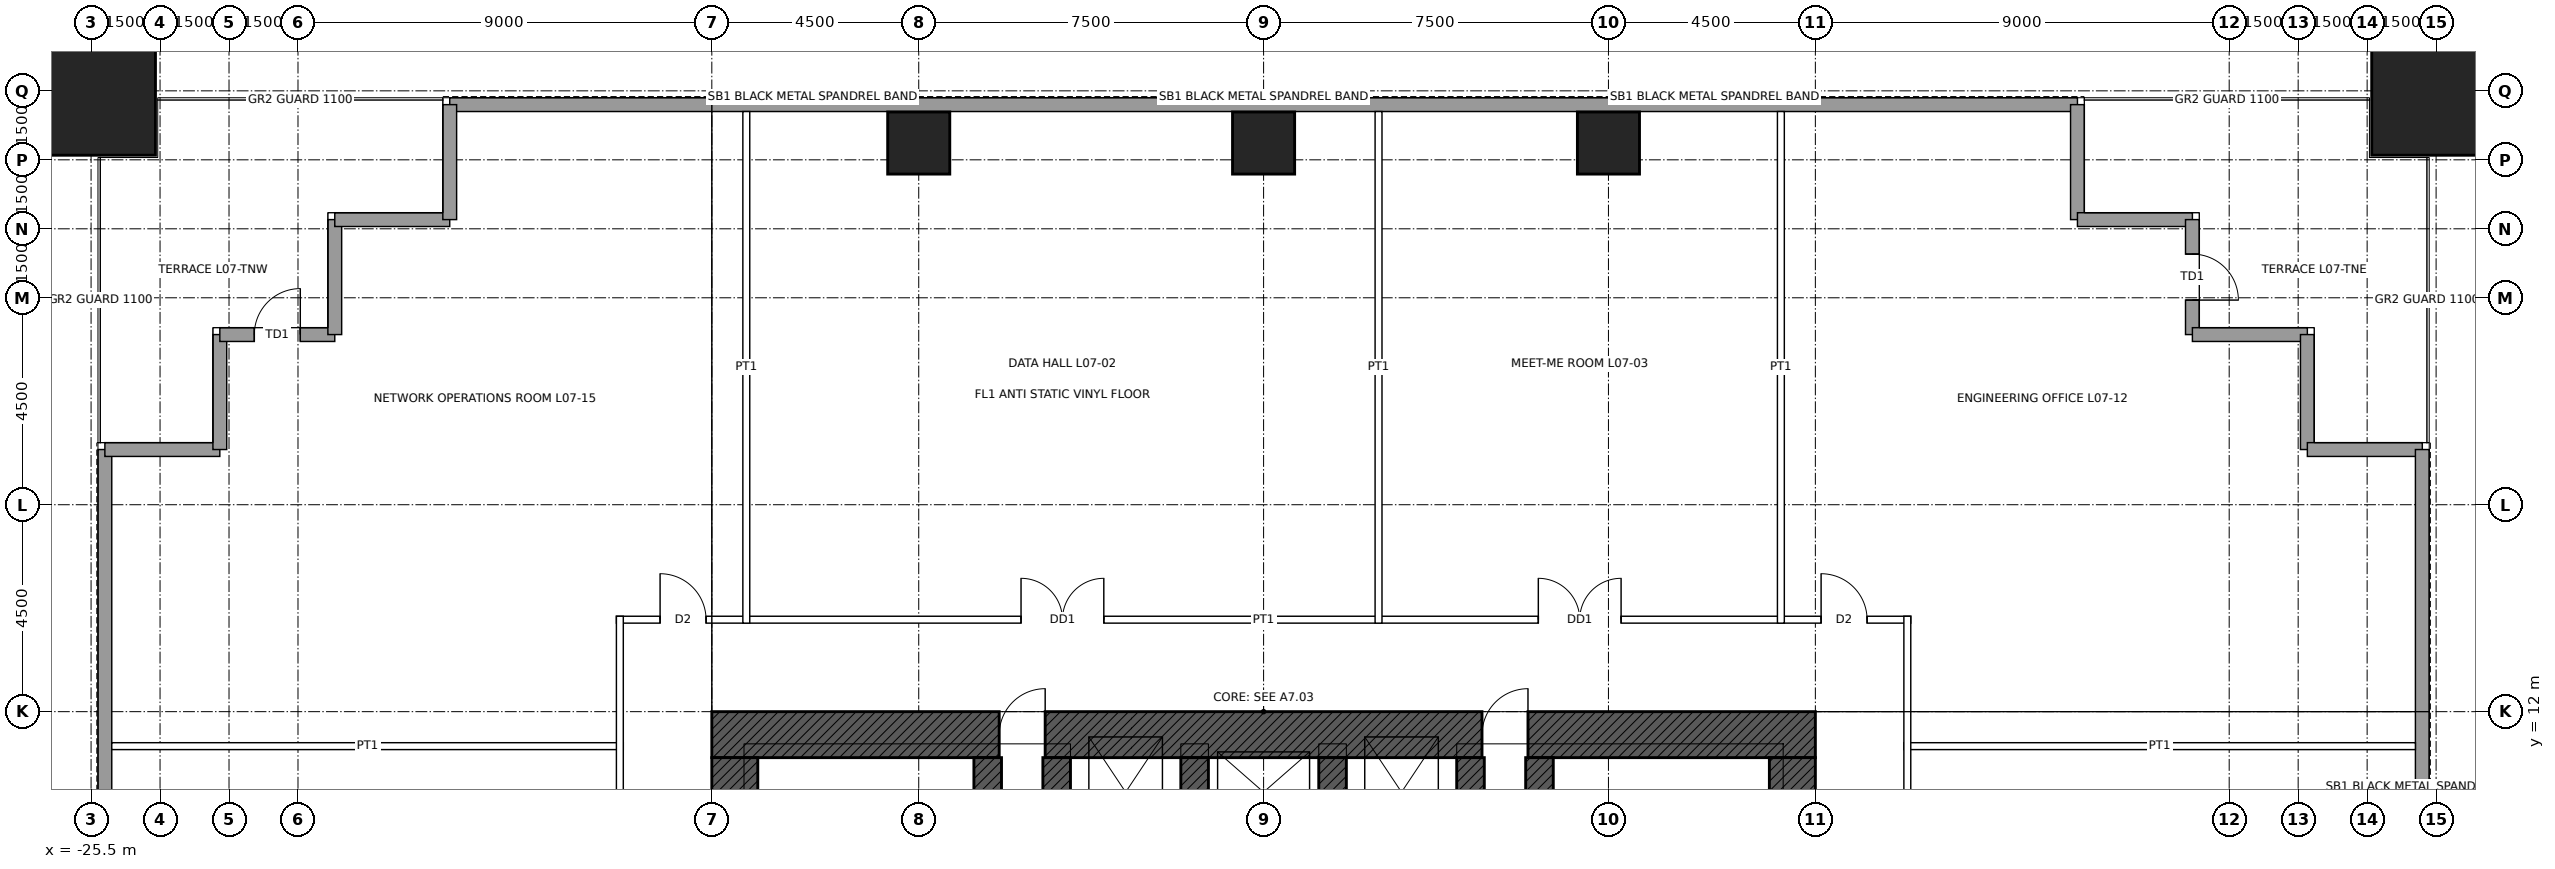
"""IFC4 building model, lengths in metres.
Left out: names, types, materials, properties, quantities, classifications, styles, units other than length and angle.
Written with IfcOpenShell. Run it as: python <this file> out.ifc"""

import sys

from ifc_helpers import new_model, si_unit, direction, frame, frame_2d, origin, origin_2d, place, context, subcontext, project, spatial, rectangle, hollow_rectangle, extrude, element, fill, save


model = new_model("IFC4")
c1 = context("Model", 3, precision=1e-05, world=origin(), true_north=direction((0.0, 1.0)))
c2 = subcontext(c1, "Body", "Model", "MODEL_VIEW")
j1 = project(units=[si_unit("LENGTHUNIT", "METRE"), si_unit("PLANEANGLEUNIT", "RADIAN")], contexts=[c1])
p1 = place(None, origin())
s1 = spatial("IfcSite", under=j1, at=p1, CompositionType="ELEMENT")
p2 = place(p1, origin())
s2 = spatial("IfcBuilding", under=s1, at=p2, CompositionType="ELEMENT")
p3 = place(p2, frame((0.0, 0.0, 38.4)))
s3 = spatial("IfcBuildingStorey", under=s2, at=p3, CompositionType="ELEMENT", Elevation=38.4)
for number, where, z_axis, x_axis in (
    (1, (25.5, 25.5, 0.0), (0.0, 0.0, 1.0), (1.0, 0.0, 0.0)),
    (2, (-25.5, 25.5, 0.0), (0.0, 0.0, 1.0), (1.0, 0.0, 0.0)),
):
    element("IfcColumn", number, at=place(p3, frame(where, z_axis=z_axis, x_axis=x_axis)), inside=s3, PredefinedType="COLUMN", context=c2, shape_type="SweptSolid", body=[
        extrude(hollow_rectangle(XDim=2.8, YDim=2.8, WallThickness=0.14, at=origin_2d()), origin(), (0.0, 0.0, 1.0), 5.0),
    ])
for number, where, z_axis, x_axis in (
    (3, (-7.5, 24.365, 0.0), (0.0, 0.0, 1.0), (1.0, 0.0, 0.0)),
    (4, (0.0, 24.365, 0.0), (0.0, 0.0, 1.0), (1.0, 0.0, 0.0)),
    (5, (7.5, 24.365, 0.0), (0.0, 0.0, 1.0), (1.0, 0.0, 0.0)),
):
    element("IfcColumn", number, at=place(p3, frame(where, z_axis=z_axis, x_axis=x_axis)), inside=s3, PredefinedType="COLUMN", context=c2, shape_type="SweptSolid", body=[
        extrude(hollow_rectangle(XDim=1.35, YDim=1.35, WallThickness=0.085, at=origin_2d()), origin(), (0.0, 0.0, 1.0), 5.0),
    ])
p4 = place(p3, frame((-12.0, 11.5, 0.0), z_axis=(0.0, 0.0, 1.0), x_axis=(1.0, 0.0, 0.0)))
e6 = element("IfcWall", 6, at=p4, inside=s3, PredefinedType="SHEAR", context=c2, shape_type="SweptSolid", body=[
    extrude(rectangle(XDim=24.0, YDim=1.0, at=frame_2d((12.0, 0.0))), origin(), (0.0, 0.0, 1.0), 5.0),
])
p5 = place(p4, frame((6.25, 0.0, 0.0)))
e7 = element("IfcOpeningElement", 7, at=p5, cuts=e6, PredefinedType="OPENING", context=c2, shape_type="SweptSolid", body=[
    extrude(rectangle(XDim=1.0, YDim=2.4, at=frame_2d((0.5, 1.2))), frame((0.0, 0.51, 0.0), z_axis=(0.0, -1.0, 0.0), x_axis=(1.0, 0.0, 0.0)), (0.0, 0.0, 1.0), 1.02),
])
p6 = place(p4, frame((16.75, 0.0, 0.0)))
e8 = element("IfcOpeningElement", 8, at=p6, cuts=e6, PredefinedType="OPENING", context=c2, shape_type="SweptSolid", body=[
    extrude(rectangle(XDim=1.0, YDim=2.4, at=frame_2d((0.5, 1.2))), frame((0.0, 0.51, 0.0), z_axis=(0.0, -1.0, 0.0), x_axis=(1.0, 0.0, 0.0)), (0.0, 0.0, 1.0), 1.02),
])
p7 = place(p3, frame((11.5, 11.0, 0.0), z_axis=(0.0, 0.0, 1.0), x_axis=(0.0, -1.0, 0.0)))
e9 = element("IfcWall", 9, at=p7, inside=s3, PredefinedType="SHEAR", context=c2, shape_type="SweptSolid", body=[
    extrude(rectangle(XDim=22.0, YDim=1.0, at=frame_2d((11.0, 0.0))), origin(), (0.0, 0.0, 1.0), 5.0),
])
p8 = place(p7, frame((10.5, 0.0, 0.0)))
e10 = element("IfcOpeningElement", 10, at=p8, cuts=e9, PredefinedType="OPENING", context=c2, shape_type="SweptSolid", body=[
    extrude(rectangle(XDim=1.0, YDim=2.4, at=frame_2d((0.5, 1.2))), frame((0.0, 0.51, 0.0), z_axis=(0.0, -1.0, 0.0), x_axis=(1.0, 0.0, 0.0)), (0.0, 0.0, 1.0), 1.02),
])
p9 = place(p3, frame((-11.5, -11.0, 0.0), z_axis=(0.0, 0.0, 1.0), x_axis=(0.0, 1.0, 0.0)))
e11 = element("IfcWall", 11, at=p9, inside=s3, PredefinedType="SHEAR", context=c2, shape_type="SweptSolid", body=[
    extrude(rectangle(XDim=22.0, YDim=1.0, at=frame_2d((11.0, 0.0))), origin(), (0.0, 0.0, 1.0), 5.0),
])
p10 = place(p9, frame((10.5, 0.0, 0.0)))
e12 = element("IfcOpeningElement", 12, at=p10, cuts=e11, PredefinedType="OPENING", context=c2, shape_type="SweptSolid", body=[
    extrude(rectangle(XDim=1.0, YDim=2.4, at=frame_2d((0.5, 1.2))), frame((0.0, 0.51, 0.0), z_axis=(0.0, -1.0, 0.0), x_axis=(1.0, 0.0, 0.0)), (0.0, 0.0, 1.0), 1.02),
])
p11 = place(p3, frame((-6.0, 4.5, 0.0), z_axis=(0.0, 0.0, 1.0), x_axis=(0.0, 1.0, 0.0)))
e13 = element("IfcWall", 13, at=p11, inside=s3, PredefinedType="SHEAR", context=c2, shape_type="SweptSolid", body=[
    extrude(rectangle(XDim=6.5, YDim=0.6, at=frame_2d((3.25, 0.0))), origin(), (0.0, 0.0, 1.0), 5.0),
])
p12 = place(p11, frame((0.6, 0.0, 0.0)))
e14 = element("IfcOpeningElement", 14, at=p12, cuts=e13, PredefinedType="OPENING", context=c2, shape_type="SweptSolid", body=[
    extrude(rectangle(XDim=1.0, YDim=2.1, at=frame_2d((0.5, 1.05))), frame((0.0, 0.31, 0.0), z_axis=(0.0, -1.0, 0.0), x_axis=(1.0, 0.0, 0.0)), (0.0, 0.0, 1.0), 0.62),
])
p13 = place(p3, frame((6.0, 4.5, 0.0), z_axis=(0.0, 0.0, 1.0), x_axis=(0.0, 1.0, 0.0)))
e15 = element("IfcWall", 15, at=p13, inside=s3, PredefinedType="SHEAR", context=c2, shape_type="SweptSolid", body=[
    extrude(rectangle(XDim=6.5, YDim=0.6, at=frame_2d((3.25, 0.0))), origin(), (0.0, 0.0, 1.0), 5.0),
])
p14 = place(p13, frame((0.6, 0.0, 0.0)))
e16 = element("IfcOpeningElement", 16, at=p14, cuts=e15, PredefinedType="OPENING", context=c2, shape_type="SweptSolid", body=[
    extrude(rectangle(XDim=1.0, YDim=2.1, at=frame_2d((0.5, 1.05))), frame((0.0, 0.31, 0.0), z_axis=(0.0, -1.0, 0.0), x_axis=(1.0, 0.0, 0.0)), (0.0, 0.0, 1.0), 0.62),
])
for number, where, z_axis, x_axis in (
    (17, (-4.5, 8.5, 0.0), (0.0, 0.0, 1.0), (0.0, 1.0, 0.0)),
    (18, (4.5, 8.5, 0.0), (0.0, 0.0, 1.0), (0.0, 1.0, 0.0)),
    (19, (-1.5, 8.5, 0.0), (0.0, 0.0, 1.0), (0.0, 1.0, 0.0)),
    (20, (1.5, 8.5, 0.0), (0.0, 0.0, 1.0), (0.0, 1.0, 0.0)),
):
    element("IfcWall", number, at=place(p3, frame(where, z_axis=z_axis, x_axis=x_axis)), inside=s3, PredefinedType="SHEAR", context=c2, shape_type="SweptSolid", body=[
        extrude(rectangle(XDim=2.5, YDim=0.6, at=frame_2d((1.25, 0.0))), origin(), (0.0, 0.0, 1.0), 5.0),
    ])
p15 = place(p3, frame((-17.7, 25.2, 0.0), z_axis=(0.0, 0.0, 1.0), x_axis=(1.0, 0.0, 0.0)))
e21 = element("IfcWall", 21, at=p15, inside=s3, PredefinedType="SOLIDWALL", context=c2, shape_type="SweptSolid", body=[
    extrude(rectangle(XDim=35.4, YDim=0.3, at=frame_2d((17.7, 0.0))), origin(), (0.0, 0.0, 1.0), 4.8),
])
for number, where, z_axis, x_axis in (
    (22, (17.7, 25.2, 0.0), (0.0, 0.0, 1.0), (0.0, -1.0, 0.0)),
    (23, (17.7, 22.7, 0.0), (0.0, 0.0, 1.0), (1.0, 0.0, 0.0)),
):
    element("IfcWall", number, at=place(p3, frame(where, z_axis=z_axis, x_axis=x_axis)), inside=s3, PredefinedType="SOLIDWALL", context=c2, shape_type="SweptSolid", body=[
        extrude(rectangle(XDim=2.5, YDim=0.3, at=frame_2d((1.25, 0.0))), origin(), (0.0, 0.0, 1.0), 4.8),
    ])
p16 = place(p3, frame((20.2, 22.7, 0.0), z_axis=(0.0, 0.0, 1.0), x_axis=(0.0, -1.0, 0.0)))
e24 = element("IfcWall", 24, at=p16, inside=s3, PredefinedType="SOLIDWALL", context=c2, shape_type="SweptSolid", body=[
    extrude(rectangle(XDim=2.5, YDim=0.3, at=frame_2d((1.25, 0.0))), origin(), (0.0, 0.0, 1.0), 4.8),
])
p17 = place(p16, frame((0.75, 0.0, 0.0)))
e25 = element("IfcOpeningElement", 25, at=p17, cuts=e24, PredefinedType="OPENING", context=c2, shape_type="SweptSolid", body=[
    extrude(rectangle(XDim=1.0, YDim=2.4, at=frame_2d((0.5, 1.2))), frame((0.0, 0.16, 0.0), z_axis=(0.0, -1.0, 0.0), x_axis=(1.0, 0.0, 0.0)), (0.0, 0.0, 1.0), 0.32),
])
for number, where, z_axis, x_axis in (
    (26, (20.2, 20.2, 0.0), (0.0, 0.0, 1.0), (1.0, 0.0, 0.0)),
    (27, (22.7, 20.2, 0.0), (0.0, 0.0, 1.0), (0.0, -1.0, 0.0)),
    (28, (22.7, 17.7, 0.0), (0.0, 0.0, 1.0), (1.0, 0.0, 0.0)),
):
    element("IfcWall", number, at=place(p3, frame(where, z_axis=z_axis, x_axis=x_axis)), inside=s3, PredefinedType="SOLIDWALL", context=c2, shape_type="SweptSolid", body=[
        extrude(rectangle(XDim=2.5, YDim=0.3, at=frame_2d((1.25, 0.0))), origin(), (0.0, 0.0, 1.0), 4.8),
    ])
for number, where, z_axis, x_axis in (
    (29, (25.2, 17.7, 0.0), (0.0, 0.0, 1.0), (0.0, -1.0, 0.0)),
    (30, (-25.2, -17.7, 0.0), (0.0, 0.0, 1.0), (0.0, 1.0, 0.0)),
):
    element("IfcWall", number, at=place(p3, frame(where, z_axis=z_axis, x_axis=x_axis)), inside=s3, PredefinedType="SOLIDWALL", context=c2, shape_type="SweptSolid", body=[
        extrude(rectangle(XDim=35.4, YDim=0.3, at=frame_2d((17.7, 0.0))), origin(), (0.0, 0.0, 1.0), 4.8),
    ])
for number, where, z_axis, x_axis in (
    (31, (-25.2, 17.7, 0.0), (0.0, 0.0, 1.0), (1.0, 0.0, 0.0)),
    (32, (-22.7, 17.7, 0.0), (0.0, 0.0, 1.0), (0.0, 1.0, 0.0)),
):
    element("IfcWall", number, at=place(p3, frame(where, z_axis=z_axis, x_axis=x_axis)), inside=s3, PredefinedType="SOLIDWALL", context=c2, shape_type="SweptSolid", body=[
        extrude(rectangle(XDim=2.5, YDim=0.3, at=frame_2d((1.25, 0.0))), origin(), (0.0, 0.0, 1.0), 4.8),
    ])
p18 = place(p3, frame((-22.7, 20.2, 0.0), z_axis=(0.0, 0.0, 1.0), x_axis=(1.0, 0.0, 0.0)))
e33 = element("IfcWall", 33, at=p18, inside=s3, PredefinedType="SOLIDWALL", context=c2, shape_type="SweptSolid", body=[
    extrude(rectangle(XDim=2.5, YDim=0.3, at=frame_2d((1.25, 0.0))), origin(), (0.0, 0.0, 1.0), 4.8),
])
p19 = place(p18, frame((0.75, 0.0, 0.0)))
e34 = element("IfcOpeningElement", 34, at=p19, cuts=e33, PredefinedType="OPENING", context=c2, shape_type="SweptSolid", body=[
    extrude(rectangle(XDim=1.0, YDim=2.4, at=frame_2d((0.5, 1.2))), frame((0.0, 0.16, 0.0), z_axis=(0.0, -1.0, 0.0), x_axis=(1.0, 0.0, 0.0)), (0.0, 0.0, 1.0), 0.32),
])
for number, where, z_axis, x_axis in (
    (35, (-20.2, 20.2, 0.0), (0.0, 0.0, 1.0), (0.0, 1.0, 0.0)),
    (36, (-20.2, 22.7, 0.0), (0.0, 0.0, 1.0), (1.0, 0.0, 0.0)),
    (37, (-17.7, 22.7, 0.0), (0.0, 0.0, 1.0), (0.0, 1.0, 0.0)),
):
    element("IfcWall", number, at=place(p3, frame(where, z_axis=z_axis, x_axis=x_axis)), inside=s3, PredefinedType="SOLIDWALL", context=c2, shape_type="SweptSolid", body=[
        extrude(rectangle(XDim=2.5, YDim=0.3, at=frame_2d((1.25, 0.0))), origin(), (0.0, 0.0, 1.0), 4.8),
    ])
for number, where, z_axis, x_axis in (
    (38, (-25.05, 11.25, 0.0), (0.0, 0.0, 1.0), (1.0, 0.0, 0.0)),
    (39, (13.925, 11.25, 0.0), (0.0, 0.0, 1.0), (1.0, 0.0, 0.0)),
):
    element("IfcWall", number, at=place(p3, frame(where, z_axis=z_axis, x_axis=x_axis)), inside=s3, PredefinedType="PARTITIONING", context=c2, shape_type="SweptSolid", body=[
        extrude(rectangle(XDim=11.125, YDim=0.15, at=frame_2d((5.562, 0.0))), origin(), (0.0, 0.0, 1.0), 3.853),
    ])
p20 = place(p3, frame((-14.075, 14.0, 0.0), z_axis=(0.0, 0.0, 1.0), x_axis=(1.0, 0.0, 0.0)))
e40 = element("IfcWall", 40, at=p20, inside=s3, PredefinedType="PARTITIONING", context=c2, shape_type="SweptSolid", body=[
    extrude(rectangle(XDim=28.15, YDim=0.15, at=frame_2d((14.075, 0.0))), origin(), (0.0, 0.0, 1.0), 4.8),
])
p21 = place(p20, frame((8.8, 0.0, 0.0)))
e41 = element("IfcOpeningElement", 41, at=p21, cuts=e40, PredefinedType="OPENING", context=c2, shape_type="SweptSolid", body=[
    extrude(rectangle(XDim=1.8, YDim=2.4, at=frame_2d((0.9, 1.2))), frame((0.0, 0.085, 0.0), z_axis=(0.0, -1.0, 0.0), x_axis=(1.0, 0.0, 0.0)), (0.0, 0.0, 1.0), 0.17),
])
p22 = place(p20, frame((20.05, 0.0, 0.0)))
e42 = element("IfcOpeningElement", 42, at=p22, cuts=e40, PredefinedType="OPENING", context=c2, shape_type="SweptSolid", body=[
    extrude(rectangle(XDim=1.8, YDim=2.4, at=frame_2d((0.9, 1.2))), frame((0.0, 0.085, 0.0), z_axis=(0.0, -1.0, 0.0), x_axis=(1.0, 0.0, 0.0)), (0.0, 0.0, 1.0), 0.17),
])
p23 = place(p20, frame((26.2, 0.0, 0.0)))
e43 = element("IfcOpeningElement", 43, at=p23, cuts=e40, PredefinedType="OPENING", context=c2, shape_type="SweptSolid", body=[
    extrude(rectangle(XDim=1.0, YDim=2.1, at=frame_2d((0.5, 1.05))), frame((0.0, 0.085, 0.0), z_axis=(0.0, -1.0, 0.0), x_axis=(1.0, 0.0, 0.0)), (0.0, 0.0, 1.0), 0.17),
])
p24 = place(p20, frame((0.95, 0.0, 0.0)))
e44 = element("IfcOpeningElement", 44, at=p24, cuts=e40, PredefinedType="OPENING", context=c2, shape_type="SweptSolid", body=[
    extrude(rectangle(XDim=1.0, YDim=2.1, at=frame_2d((0.5, 1.05))), frame((0.0, 0.085, 0.0), z_axis=(0.0, -1.0, 0.0), x_axis=(1.0, 0.0, 0.0)), (0.0, 0.0, 1.0), 0.17),
])
p25 = place(p3, frame((-14.0, -14.075, 0.0), z_axis=(0.0, 0.0, 1.0), x_axis=(0.0, 1.0, 0.0)))
e45 = element("IfcWall", 45, at=p25, inside=s3, PredefinedType="PARTITIONING", context=c2, shape_type="SweptSolid", body=[
    extrude(rectangle(XDim=28.15, YDim=0.15, at=frame_2d((14.075, 0.0))), origin(), (0.0, 0.0, 1.0), 4.8),
])
p26 = place(p25, frame((4.425, 0.0, 0.0)))
e46 = element("IfcOpeningElement", 46, at=p26, cuts=e45, PredefinedType="OPENING", context=c2, shape_type="SweptSolid", body=[
    extrude(rectangle(XDim=1.8, YDim=2.4, at=frame_2d((0.9, 1.2))), frame((0.0, 0.085, 0.0), z_axis=(0.0, -1.0, 0.0), x_axis=(1.0, 0.0, 0.0)), (0.0, 0.0, 1.0), 0.17),
])
p27 = place(p25, frame((11.075, 0.0, 0.0)))
e47 = element("IfcOpeningElement", 47, at=p27, cuts=e45, PredefinedType="OPENING", context=c2, shape_type="SweptSolid", body=[
    extrude(rectangle(XDim=1.0, YDim=2.1, at=frame_2d((0.5, 1.05))), frame((0.0, 0.085, 0.0), z_axis=(0.0, -1.0, 0.0), x_axis=(1.0, 0.0, 0.0)), (0.0, 0.0, 1.0), 0.17),
])
p28 = place(p25, frame((19.825, 0.0, 0.0)))
e48 = element("IfcOpeningElement", 48, at=p28, cuts=e45, PredefinedType="OPENING", context=c2, shape_type="SweptSolid", body=[
    extrude(rectangle(XDim=1.0, YDim=2.1, at=frame_2d((0.5, 1.05))), frame((0.0, 0.085, 0.0), z_axis=(0.0, -1.0, 0.0), x_axis=(1.0, 0.0, 0.0)), (0.0, 0.0, 1.0), 0.17),
])
p29 = place(p3, frame((-11.25, 13.925, 0.0), z_axis=(0.0, 0.0, 1.0), x_axis=(0.0, 1.0, 0.0)))
e49 = element("IfcWall", 49, at=p29, inside=s3, PredefinedType="PARTITIONING", context=c2, shape_type="SweptSolid", body=[
    extrude(rectangle(XDim=11.125, YDim=0.15, at=frame_2d((5.562, 0.0))), origin(), (0.0, 0.0, 1.0), 3.853),
])
p30 = place(p3, frame((2.5, 13.925, 0.0), z_axis=(0.0, 0.0, 1.0), x_axis=(0.0, 1.0, 0.0)))
e50 = element("IfcWall", 50, at=p30, inside=s3, PredefinedType="PARTITIONING", context=c2, shape_type="SweptSolid", body=[
    extrude(rectangle(XDim=11.125, YDim=0.15, at=frame_2d((5.562, 0.0))), origin(), (0.0, 0.0, 1.0), 4.8),
])
p31 = place(p3, frame((11.25, 13.925, 0.0), z_axis=(0.0, 0.0, 1.0), x_axis=(0.0, 1.0, 0.0)))
e51 = element("IfcWall", 51, at=p31, inside=s3, PredefinedType="PARTITIONING", context=c2, shape_type="SweptSolid", body=[
    extrude(rectangle(XDim=11.125, YDim=0.15, at=frame_2d((5.562, 0.0))), origin(), (0.0, 0.0, 1.0), 3.853),
])
p32 = place(p3, frame((14.0, -14.075, 0.0), z_axis=(0.0, 0.0, 1.0), x_axis=(0.0, 1.0, 0.0)))
e52 = element("IfcWall", 52, at=p32, inside=s3, PredefinedType="PARTITIONING", context=c2, shape_type="SweptSolid", body=[
    extrude(rectangle(XDim=28.15, YDim=0.15, at=frame_2d((14.075, 0.0))), origin(), (0.0, 0.0, 1.0), 4.8),
])
p33 = place(p32, frame((20.45, 0.0, 0.0)))
e53 = element("IfcOpeningElement", 53, at=p33, cuts=e52, PredefinedType="OPENING", context=c2, shape_type="SweptSolid", body=[
    extrude(rectangle(XDim=1.0, YDim=2.1, at=frame_2d((0.5, 1.05))), frame((0.0, 0.085, 0.0), z_axis=(0.0, -1.0, 0.0), x_axis=(1.0, 0.0, 0.0)), (0.0, 0.0, 1.0), 0.17),
])
p34 = place(p32, frame((8.8, 0.0, 0.0)))
e54 = element("IfcOpeningElement", 54, at=p34, cuts=e52, PredefinedType="OPENING", context=c2, shape_type="SweptSolid", body=[
    extrude(rectangle(XDim=1.8, YDim=2.4, at=frame_2d((0.9, 1.2))), frame((0.0, 0.085, 0.0), z_axis=(0.0, -1.0, 0.0), x_axis=(1.0, 0.0, 0.0)), (0.0, 0.0, 1.0), 0.17),
])
p35 = place(p17, origin())
e55 = element("IfcDoor", 55, at=p35, inside=s3, OperationType="SINGLE_SWING_RIGHT", PredefinedType="DOOR", context=c2, shape_type="SweptSolid", body=[
    extrude(rectangle(XDim=1.0, YDim=2.4, at=frame_2d((0.5, 1.2))), frame((0.0, 0.025, 0.0), z_axis=(0.0, -1.0, 0.0), x_axis=(1.0, 0.0, 0.0)), (0.0, 0.0, 1.0), 0.05),
])
fill(e25, e55)
p36 = place(p19, origin())
e56 = element("IfcDoor", 56, at=p36, inside=s3, OperationType="SINGLE_SWING_RIGHT", PredefinedType="DOOR", context=c2, shape_type="SweptSolid", body=[
    extrude(rectangle(XDim=1.0, YDim=2.4, at=frame_2d((0.5, 1.2))), frame((0.0, 0.025, 0.0), z_axis=(0.0, -1.0, 0.0), x_axis=(1.0, 0.0, 0.0)), (0.0, 0.0, 1.0), 0.05),
])
fill(e34, e56)
p37 = place(p5, origin())
e57 = element("IfcDoor", 57, at=p37, inside=s3, OperationType="SINGLE_SWING_RIGHT", PredefinedType="DOOR", context=c2, shape_type="SweptSolid", body=[
    extrude(rectangle(XDim=1.0, YDim=2.4, at=frame_2d((0.5, 1.2))), frame((0.0, 0.485, 0.0), z_axis=(0.0, -1.0, 0.0), x_axis=(1.0, 0.0, 0.0)), (0.0, 0.0, 1.0), 0.05),
])
fill(e7, e57)
p38 = place(p6, origin())
e58 = element("IfcDoor", 58, at=p38, inside=s3, OperationType="SINGLE_SWING_RIGHT", PredefinedType="DOOR", context=c2, shape_type="SweptSolid", body=[
    extrude(rectangle(XDim=1.0, YDim=2.4, at=frame_2d((0.5, 1.2))), frame((0.0, 0.485, 0.0), z_axis=(0.0, -1.0, 0.0), x_axis=(1.0, 0.0, 0.0)), (0.0, 0.0, 1.0), 0.05),
])
fill(e8, e58)
p39 = place(p21, origin())
e59 = element("IfcDoor", 59, at=p39, inside=s3, OperationType="DOUBLE_DOOR_SINGLE_SWING", PredefinedType="DOOR", context=c2, shape_type="SweptSolid", body=[
    extrude(rectangle(XDim=1.8, YDim=2.4, at=frame_2d((0.9, 1.2))), frame((0.0, 0.025, 0.0), z_axis=(0.0, -1.0, 0.0), x_axis=(1.0, 0.0, 0.0)), (0.0, 0.0, 1.0), 0.05),
])
fill(e41, e59)
p40 = place(p22, origin())
e60 = element("IfcDoor", 60, at=p40, inside=s3, OperationType="DOUBLE_DOOR_SINGLE_SWING", PredefinedType="DOOR", context=c2, shape_type="SweptSolid", body=[
    extrude(rectangle(XDim=1.8, YDim=2.4, at=frame_2d((0.9, 1.2))), frame((0.0, 0.025, 0.0), z_axis=(0.0, -1.0, 0.0), x_axis=(1.0, 0.0, 0.0)), (0.0, 0.0, 1.0), 0.05),
])
fill(e42, e60)
p41 = place(p23, origin())
e61 = element("IfcDoor", 61, at=p41, inside=s3, OperationType="SINGLE_SWING_LEFT", PredefinedType="DOOR", context=c2, shape_type="SweptSolid", body=[
    extrude(rectangle(XDim=1.0, YDim=2.1, at=frame_2d((0.5, 1.05))), frame((0.0, 0.025, 0.0), z_axis=(0.0, -1.0, 0.0), x_axis=(1.0, 0.0, 0.0)), (0.0, 0.0, 1.0), 0.05),
])
fill(e43, e61)
p42 = place(p24, origin())
e62 = element("IfcDoor", 62, at=p42, inside=s3, OperationType="SINGLE_SWING_LEFT", PredefinedType="DOOR", context=c2, shape_type="SweptSolid", body=[
    extrude(rectangle(XDim=1.0, YDim=2.1, at=frame_2d((0.5, 1.05))), frame((0.0, 0.025, 0.0), z_axis=(0.0, -1.0, 0.0), x_axis=(1.0, 0.0, 0.0)), (0.0, 0.0, 1.0), 0.05),
])
fill(e44, e62)
save(model, sys.argv[1])
